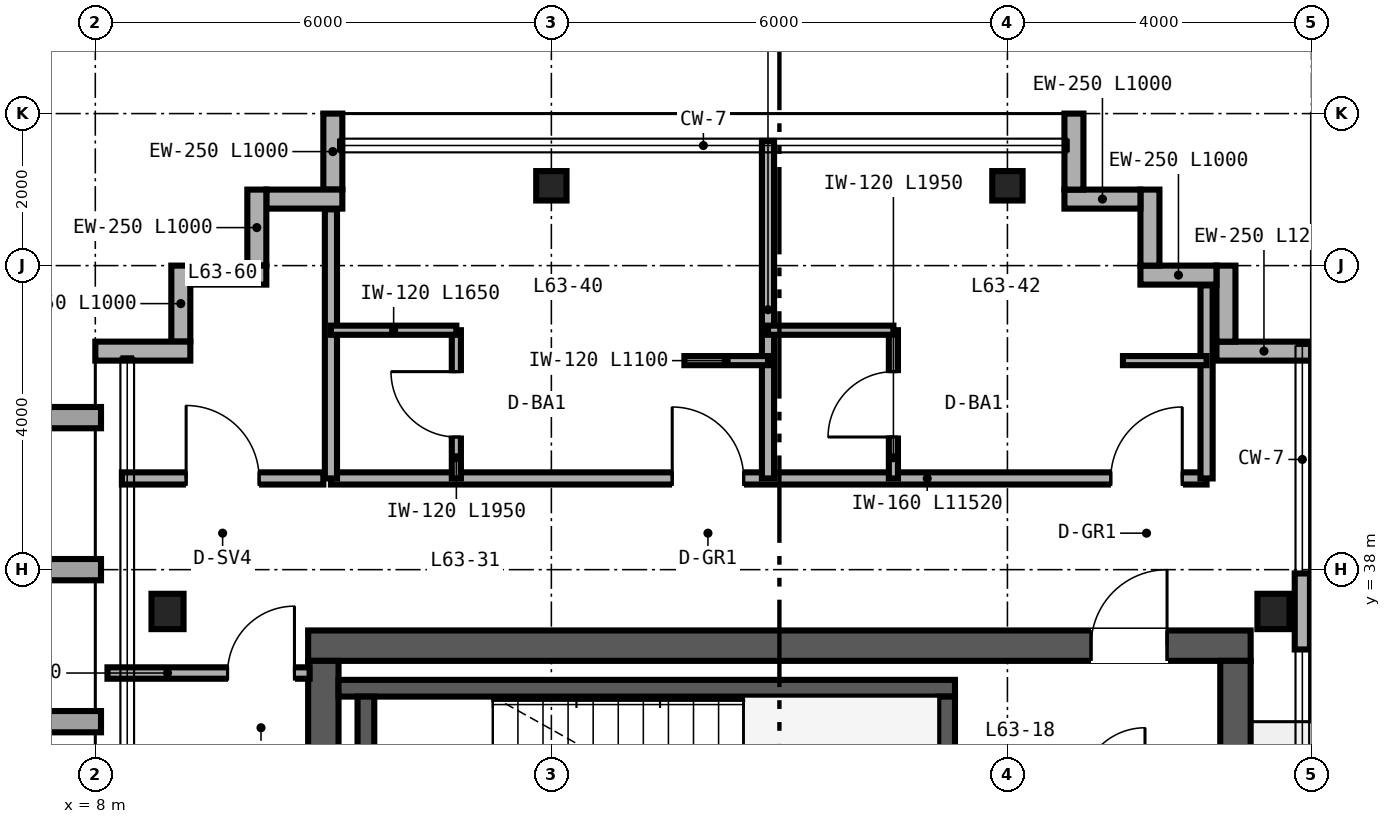
"""IFC4 building model, lengths in metres.
Left out: names, types, materials, properties, quantities, classifications, styles, units other than length and angle.
Written with IfcOpenShell. Run it as: python <this file> out.ifc"""

import sys

from ifc_helpers import new_model, si_unit, direction, frame, frame_2d, origin, origin_2d, place, context, subcontext, project, spatial, rectangle, i_section, extrude, source, transform, mapped, element, fill, save


model = new_model("IFC4")
c1 = context("Model", 3, precision=1e-05, world=origin(), true_north=direction((0.0, 1.0)))
c2 = subcontext(c1, "Body", "Model", "MODEL_VIEW")
j1 = project(units=[si_unit("LENGTHUNIT", "METRE"), si_unit("PLANEANGLEUNIT", "RADIAN")], contexts=[c1])
p1 = place(None, origin())
s1 = spatial("IfcSite", under=j1, at=p1, CompositionType="ELEMENT")
p2 = place(p1, origin())
s2 = spatial("IfcBuilding", under=s1, at=p2, CompositionType="ELEMENT")
p3 = place(p2, frame((0.0, 0.0, 250.8)))
s3 = spatial("IfcBuildingStorey", under=s2, at=p3, CompositionType="ELEMENT", Elevation=250.8)
p4 = place(p3, frame((10.8, 37.0, 0.0), z_axis=(0.0, 0.0, 1.0), x_axis=(1.0, 0.0, 0.0)))
e1 = element("IfcWall", 1, at=p4, inside=s3, PredefinedType="SHEAR", context=c2, shape_type="SweptSolid", body=[
    extrude(rectangle(XDim=12.4, YDim=0.4, at=frame_2d((6.2, 0.0))), origin(), (0.0, 0.0, 1.0), 3.38),
])
p5 = place(p4, frame((10.3, 0.0, 0.0)))
e2 = element("IfcOpeningElement", 2, at=p5, cuts=e1, PredefinedType="OPENING", context=c2, shape_type="SweptSolid", body=[
    extrude(rectangle(XDim=1.0, YDim=2.15, at=frame_2d((0.5, 1.075))), frame((0.0, 0.21, 0.0), z_axis=(0.0, -1.0, 0.0), x_axis=(1.0, 0.0, 0.0)), (0.0, 0.0, 1.0), 0.42),
])
for number, where, z_axis, x_axis in (
    (3, (11.0, 15.2, 0.0), (0.0, 0.0, 1.0), (0.0, 1.0, 0.0)),
    (4, (23.0, 15.2, 0.0), (0.0, 0.0, 1.0), (0.0, 1.0, 0.0)),
):
    element("IfcWall", number, at=place(p3, frame(where, z_axis=z_axis, x_axis=x_axis)), inside=s3, PredefinedType="SHEAR", context=c2, shape_type="SweptSolid", body=[
        extrude(rectangle(XDim=21.6, YDim=0.4, at=frame_2d((10.8, 0.0))), origin(), (0.0, 0.0, 1.0), 3.38),
    ])
p6 = place(p3, frame((11.2, 36.44, 0.0), z_axis=(0.0, 0.0, 1.0), x_axis=(1.0, 0.0, 0.0)))
e5 = element("IfcWall", 5, at=p6, inside=s3, PredefinedType="SHEAR", context=c2, shape_type="SweptSolid", body=[
    extrude(rectangle(XDim=8.11, YDim=0.22, at=frame_2d((4.055, 0.0))), origin(), (0.0, 0.0, 1.0), 3.4),
])
for number, where, z_axis, x_axis in (
    (6, (11.56, 33.05, 0.0), (0.0, 0.0, 1.0), (0.0, 1.0, 0.0)),
    (7, (19.2, 33.05, 0.0), (0.0, 0.0, 1.0), (0.0, 1.0, 0.0)),
):
    element("IfcWall", number, at=place(p3, frame(where, z_axis=z_axis, x_axis=x_axis)), inside=s3, PredefinedType="SHEAR", context=c2, shape_type="SweptSolid", body=[
        extrude(rectangle(XDim=3.28, YDim=0.22, at=frame_2d((1.64, 0.0))), origin(), (0.0, 0.0, 1.0), 3.4),
    ])
m1 = source(origin(), c2, "Body", "SweptSolid", [
    extrude(i_section(OverallWidth=0.422, OverallDepth=0.465, WebThickness=0.045, FlangeThickness=0.073, FilletRadius=0.025, at=origin_2d()), origin(), (0.0, 0.0, 1.0), 3.38),
])
for number, where, z_axis, x_axis in (
    (8, (8.95, 37.45, 0.0), (0.0, 0.0, 1.0), (1.0, 0.0, 0.0)),
    (9, (23.5, 37.45, 0.0), (0.0, 0.0, 1.0), (1.0, 0.0, 0.0)),
):
    element("IfcColumn", number, at=place(p3, frame(where, z_axis=z_axis, x_axis=x_axis)), inside=s3, PredefinedType="COLUMN", context=c2, shape_type="MappedRepresentation", body=[
        mapped(m1, transform((0.0, 0.0, 0.0), scale=1.0)),
    ])
m2 = source(origin(), c2, "Body", "SweptSolid", [
    extrude(i_section(OverallWidth=0.399, OverallDepth=0.387, WebThickness=0.021, FlangeThickness=0.033, FilletRadius=0.025, at=origin_2d()), origin(), (0.0, 0.0, 1.0), 3.38),
])
for number, where, z_axis, x_axis in (
    (10, (14.0, 43.05, 0.0), (0.0, 0.0, 1.0), (1.0, 0.0, 0.0)),
    (11, (20.0, 43.05, 0.0), (0.0, 0.0, 1.0), (1.0, 0.0, 0.0)),
):
    element("IfcColumn", number, at=place(p3, frame(where, z_axis=z_axis, x_axis=x_axis)), inside=s3, PredefinedType="COLUMN", context=c2, shape_type="MappedRepresentation", body=[
        mapped(m2, transform((0.0, 0.0, 0.0), scale=1.0)),
    ])
p7 = place(p3, frame((24.0, 40.875, 0.0), z_axis=(0.0, 0.0, 1.0), x_axis=(-1.0, 0.0, 0.0)))
e12 = element("IfcWall", 12, at=p7, inside=s3, PredefinedType="SOLIDWALL", context=c2, shape_type="SweptSolid", body=[
    extrude(rectangle(XDim=1.25, YDim=0.25, at=frame_2d((0.625, 0.0))), origin(), (0.0, 0.0, 1.0), 3.38),
])
for number, where, z_axis, x_axis in (
    (13, (22.875, 41.0, 0.0), (0.0, 0.0, 1.0), (0.0, 1.0, 0.0)),
    (14, (22.75, 41.875, 0.0), (0.0, 0.0, 1.0), (-1.0, 0.0, 0.0)),
    (15, (21.875, 42.0, 0.0), (0.0, 0.0, 1.0), (0.0, 1.0, 0.0)),
    (16, (21.75, 42.875, 0.0), (0.0, 0.0, 1.0), (-1.0, 0.0, 0.0)),
    (17, (20.875, 43.0, 0.0), (0.0, 0.0, 1.0), (0.0, 1.0, 0.0)),
    (18, (11.125, 44.0, 0.0), (0.0, 0.0, 1.0), (0.0, -1.0, 0.0)),
    (19, (11.25, 42.875, 0.0), (0.0, 0.0, 1.0), (-1.0, 0.0, 0.0)),
    (20, (10.125, 43.0, 0.0), (0.0, 0.0, 1.0), (0.0, -1.0, 0.0)),
    (21, (10.25, 41.875, 0.0), (0.0, 0.0, 1.0), (-1.0, 0.0, 0.0)),
    (22, (9.125, 42.0, 0.0), (0.0, 0.0, 1.0), (0.0, -1.0, 0.0)),
):
    element("IfcWall", number, at=place(p3, frame(where, z_axis=z_axis, x_axis=x_axis)), inside=s3, PredefinedType="SOLIDWALL", context=c2, shape_type="SweptSolid", body=[
        extrude(rectangle(XDim=1.0, YDim=0.25, at=frame_2d((0.5, 0.0))), origin(), (0.0, 0.0, 1.0), 3.38),
    ])
p8 = place(p3, frame((9.25, 40.875, 0.0), z_axis=(0.0, 0.0, 1.0), x_axis=(-1.0, 0.0, 0.0)))
e23 = element("IfcWall", 23, at=p8, inside=s3, PredefinedType="SOLIDWALL", context=c2, shape_type="SweptSolid", body=[
    extrude(rectangle(XDim=1.25, YDim=0.25, at=frame_2d((0.625, 0.0))), origin(), (0.0, 0.0, 1.0), 3.38),
])
p9 = place(p3, frame((23.88, 36.95, 0.0), z_axis=(0.0, 0.0, 1.0), x_axis=(0.0, 1.0, 0.0)))
e24 = element("IfcWall", 24, at=p9, inside=s3, PredefinedType="PARAPET", context=c2, shape_type="SweptSolid", body=[
    extrude(rectangle(XDim=1.0, YDim=0.2, at=frame_2d((0.5, 0.0))), origin(), (0.0, 0.0, 1.0), 3.38),
])
p10 = place(p3, frame((11.1, 39.2, 0.0), z_axis=(0.0, 0.0, 1.0), x_axis=(1.0, 0.0, 0.0)))
e25 = element("IfcWall", 25, at=p10, inside=s3, PredefinedType="PARTITIONING", context=c2, shape_type="SweptSolid", body=[
    extrude(rectangle(XDim=11.52, YDim=0.16, at=frame_2d((5.76, 0.0))), origin(), (0.0, 0.0, 1.0), 3.38),
])
p11 = place(p10, frame((4.49, 0.0, 0.0)))
e26 = element("IfcOpeningElement", 26, at=p11, cuts=e25, PredefinedType="OPENING", context=c2, shape_type="SweptSolid", body=[
    extrude(rectangle(XDim=0.94, YDim=2.15, at=frame_2d((0.47, 1.075))), frame((0.0, 0.09, 0.0), z_axis=(0.0, -1.0, 0.0), x_axis=(1.0, 0.0, 0.0)), (0.0, 0.0, 1.0), 0.18),
])
p12 = place(p10, frame((10.26, 0.0, 0.0)))
e27 = element("IfcOpeningElement", 27, at=p12, cuts=e25, PredefinedType="OPENING", context=c2, shape_type="SweptSolid", body=[
    extrude(rectangle(XDim=0.94, YDim=2.15, at=frame_2d((0.47, 1.075))), frame((0.0, 0.09, 0.0), z_axis=(0.0, -1.0, 0.0), x_axis=(1.0, 0.0, 0.0)), (0.0, 0.0, 1.0), 0.18),
])
p13 = place(p3, frame((11.1, 39.2, 0.0), z_axis=(0.0, 0.0, 1.0), x_axis=(0.0, 1.0, 0.0)))
e28 = element("IfcWall", 28, at=p13, inside=s3, PredefinedType="PARTITIONING", context=c2, shape_type="SweptSolid", body=[
    extrude(rectangle(XDim=3.54, YDim=0.16, at=frame_2d((1.77, 0.0))), origin(), (0.0, 0.0, 1.0), 3.38),
])
p14 = place(p3, frame((22.62, 39.2, 0.0), z_axis=(0.0, 0.0, 1.0), x_axis=(0.0, 1.0, 0.0)))
e29 = element("IfcWall", 29, at=p14, inside=s3, PredefinedType="PARTITIONING", context=c2, shape_type="SweptSolid", body=[
    extrude(rectangle(XDim=2.54, YDim=0.16, at=frame_2d((1.27, 0.0))), origin(), (0.0, 0.0, 1.0), 3.38),
])
p15 = place(p3, frame((16.85, 39.2, 0.0), z_axis=(0.0, 0.0, 1.0), x_axis=(0.0, 1.0, 0.0)))
e30 = element("IfcWall", 30, at=p15, inside=s3, PredefinedType="PARTITIONING", context=c2, shape_type="SweptSolid", body=[
    extrude(rectangle(XDim=4.44, YDim=0.16, at=frame_2d((2.22, 0.0))), origin(), (0.0, 0.0, 1.0), 2.687),
])
p16 = place(p3, frame((12.75, 39.2, 0.0), z_axis=(0.0, 0.0, 1.0), x_axis=(0.0, 1.0, 0.0)))
e31 = element("IfcWall", 31, at=p16, inside=s3, PredefinedType="PARTITIONING", context=c2, shape_type="SweptSolid", body=[
    extrude(rectangle(XDim=1.95, YDim=0.12, at=frame_2d((0.975, 0.0))), origin(), (0.0, 0.0, 1.0), 3.38),
])
p17 = place(p16, frame((0.545, 0.0, 0.0)))
e32 = element("IfcOpeningElement", 32, at=p17, cuts=e31, PredefinedType="OPENING", context=c2, shape_type="SweptSolid", body=[
    extrude(rectangle(XDim=0.86, YDim=2.1, at=frame_2d((0.43, 1.05))), frame((0.0, 0.07, 0.0), z_axis=(0.0, -1.0, 0.0), x_axis=(1.0, 0.0, 0.0)), (0.0, 0.0, 1.0), 0.14),
])
p18 = place(p3, frame((11.1, 41.15, 0.0), z_axis=(0.0, 0.0, 1.0), x_axis=(1.0, 0.0, 0.0)))
e33 = element("IfcWall", 33, at=p18, inside=s3, PredefinedType="PARTITIONING", context=c2, shape_type="SweptSolid", body=[
    extrude(rectangle(XDim=1.65, YDim=0.12, at=frame_2d((0.825, 0.0))), origin(), (0.0, 0.0, 1.0), 3.38),
])
p19 = place(p3, frame((15.75, 40.75, 0.0), z_axis=(0.0, 0.0, 1.0), x_axis=(1.0, 0.0, 0.0)))
e34 = element("IfcWall", 34, at=p19, inside=s3, PredefinedType="PARTITIONING", context=c2, shape_type="SweptSolid", body=[
    extrude(rectangle(XDim=1.1, YDim=0.12, at=frame_2d((0.55, 0.0))), origin(), (0.0, 0.0, 1.0), 3.38),
])
p20 = place(p3, frame((18.5, 39.2, 0.0), z_axis=(0.0, 0.0, 1.0), x_axis=(0.0, 1.0, 0.0)))
e35 = element("IfcWall", 35, at=p20, inside=s3, PredefinedType="PARTITIONING", context=c2, shape_type="SweptSolid", body=[
    extrude(rectangle(XDim=1.95, YDim=0.12, at=frame_2d((0.975, 0.0))), origin(), (0.0, 0.0, 1.0), 3.38),
])
p21 = place(p20, frame((0.545, 0.0, 0.0)))
e36 = element("IfcOpeningElement", 36, at=p21, cuts=e35, PredefinedType="OPENING", context=c2, shape_type="SweptSolid", body=[
    extrude(rectangle(XDim=0.86, YDim=2.1, at=frame_2d((0.43, 1.05))), frame((0.0, 0.07, 0.0), z_axis=(0.0, -1.0, 0.0), x_axis=(1.0, 0.0, 0.0)), (0.0, 0.0, 1.0), 0.14),
])
p22 = place(p3, frame((16.85, 41.15, 0.0), z_axis=(0.0, 0.0, 1.0), x_axis=(1.0, 0.0, 0.0)))
e37 = element("IfcWall", 37, at=p22, inside=s3, PredefinedType="PARTITIONING", context=c2, shape_type="SweptSolid", body=[
    extrude(rectangle(XDim=1.65, YDim=0.12, at=frame_2d((0.825, 0.0))), origin(), (0.0, 0.0, 1.0), 3.38),
])
p23 = place(p3, frame((21.52, 40.75, 0.0), z_axis=(0.0, 0.0, 1.0), x_axis=(1.0, 0.0, 0.0)))
e38 = element("IfcWall", 38, at=p23, inside=s3, PredefinedType="PARTITIONING", context=c2, shape_type="SweptSolid", body=[
    extrude(rectangle(XDim=1.1, YDim=0.12, at=frame_2d((0.55, 0.0))), origin(), (0.0, 0.0, 1.0), 3.38),
])
p24 = place(p3, frame((8.16, 36.64, 0.0), z_axis=(0.0, 0.0, 1.0), x_axis=(1.0, 0.0, 0.0)))
e39 = element("IfcWall", 39, at=p24, inside=s3, PredefinedType="PARTITIONING", context=c2, shape_type="SweptSolid", body=[
    extrude(rectangle(XDim=2.66, YDim=0.15, at=frame_2d((1.33, 0.0))), origin(), (0.0, 0.0, 1.0), 2.763),
])
p25 = place(p24, frame((1.58, 0.0, 0.0)))
e40 = element("IfcOpeningElement", 40, at=p25, cuts=e39, PredefinedType="OPENING", context=c2, shape_type="SweptSolid", body=[
    extrude(rectangle(XDim=0.88, YDim=2.15, at=frame_2d((0.44, 1.075))), frame((0.0, 0.085, 0.0), z_axis=(0.0, -1.0, 0.0), x_axis=(1.0, 0.0, 0.0)), (0.0, 0.0, 1.0), 0.17),
])
p26 = place(p3, frame((8.35, 39.2, 0.0), z_axis=(0.0, 0.0, 1.0), x_axis=(1.0, 0.0, 0.0)))
e41 = element("IfcWall", 41, at=p26, inside=s3, PredefinedType="PARTITIONING", context=c2, shape_type="SweptSolid", body=[
    extrude(rectangle(XDim=2.65, YDim=0.16, at=frame_2d((1.325, 0.0))), origin(), (0.0, 0.0, 1.0), 3.38),
])
p27 = place(p26, frame((0.845, 0.0, 0.0)))
e42 = element("IfcOpeningElement", 42, at=p27, cuts=e41, PredefinedType="OPENING", context=c2, shape_type="SweptSolid", body=[
    extrude(rectangle(XDim=0.96, YDim=2.15, at=frame_2d((0.48, 1.075))), frame((0.0, 0.09, 0.0), z_axis=(0.0, -1.0, 0.0), x_axis=(1.0, 0.0, 0.0)), (0.0, 0.0, 1.0), 0.18),
])
m3 = source(origin(), c2, "Body", "SweptSolid", [
    extrude(rectangle(XDim=1.0, YDim=2.15, at=frame_2d((0.5, 1.075))), frame((0.0, 0.025, 0.0), z_axis=(0.0, -1.0, 0.0), x_axis=(1.0, 0.0, 0.0)), (0.0, 0.0, 1.0), 0.05),
])
p28 = place(p5, origin())
e43 = element("IfcDoor", 43, at=p28, inside=s3, OperationType="SINGLE_SWING_RIGHT", PredefinedType="DOOR", context=c2, shape_type="MappedRepresentation", body=[
    mapped(m3, transform((0.0, 0.0, 0.0), scale=1.0)),
])
fill(e2, e43)
m4 = source(origin(), c2, "Body", "SweptSolid", [
    extrude(rectangle(XDim=0.86, YDim=2.1, at=frame_2d((0.43, 1.05))), frame((0.0, 0.025, 0.0), z_axis=(0.0, -1.0, 0.0), x_axis=(1.0, 0.0, 0.0)), (0.0, 0.0, 1.0), 0.05),
])
p29 = place(p17, origin())
e44 = element("IfcDoor", 44, at=p29, inside=s3, OperationType="SINGLE_SWING_RIGHT", PredefinedType="DOOR", context=c2, shape_type="MappedRepresentation", body=[
    mapped(m4, transform((0.0, 0.0, 0.0), scale=1.0)),
])
fill(e32, e44)
p30 = place(p21, origin())
e45 = element("IfcDoor", 45, at=p30, inside=s3, OperationType="SINGLE_SWING_LEFT", PredefinedType="DOOR", context=c2, shape_type="MappedRepresentation", body=[
    mapped(m4, transform((0.0, 0.0, 0.0), scale=1.0)),
])
fill(e36, e45)
m5 = source(origin(), c2, "Body", "SweptSolid", [
    extrude(rectangle(XDim=0.94, YDim=2.15, at=frame_2d((0.47, 1.075))), frame((0.0, 0.025, 0.0), z_axis=(0.0, -1.0, 0.0), x_axis=(1.0, 0.0, 0.0)), (0.0, 0.0, 1.0), 0.05),
])
p31 = place(p11, origin())
e46 = element("IfcDoor", 46, at=p31, inside=s3, OperationType="SINGLE_SWING_LEFT", PredefinedType="DOOR", context=c2, shape_type="MappedRepresentation", body=[
    mapped(m5, transform((0.0, 0.0, 0.0), scale=1.0)),
])
fill(e26, e46)
p32 = place(p12, origin())
e47 = element("IfcDoor", 47, at=p32, inside=s3, OperationType="SINGLE_SWING_RIGHT", PredefinedType="DOOR", context=c2, shape_type="MappedRepresentation", body=[
    mapped(m5, transform((0.0, 0.0, 0.0), scale=1.0)),
])
fill(e27, e47)
m6 = source(origin(), c2, "Body", "SweptSolid", [
    extrude(rectangle(XDim=0.88, YDim=2.15, at=frame_2d((0.44, 1.075))), frame((0.0, 0.025, 0.0), z_axis=(0.0, -1.0, 0.0), x_axis=(1.0, 0.0, 0.0)), (0.0, 0.0, 1.0), 0.05),
])
p33 = place(p25, origin())
e48 = element("IfcDoor", 48, at=p33, inside=s3, OperationType="SINGLE_SWING_RIGHT", PredefinedType="DOOR", context=c2, shape_type="MappedRepresentation", body=[
    mapped(m6, transform((0.0, 0.0, 0.0), scale=1.0)),
])
fill(e40, e48)
m7 = source(origin(), c2, "Body", "SweptSolid", [
    extrude(rectangle(XDim=0.96, YDim=2.15, at=frame_2d((0.48, 1.075))), frame((0.0, 0.025, 0.0), z_axis=(0.0, -1.0, 0.0), x_axis=(1.0, 0.0, 0.0)), (0.0, 0.0, 1.0), 0.05),
])
p34 = place(p27, origin())
e49 = element("IfcDoor", 49, at=p34, inside=s3, OperationType="SINGLE_SWING_LEFT", PredefinedType="DOOR", context=c2, shape_type="MappedRepresentation", body=[
    mapped(m7, transform((0.0, 0.0, 0.0), scale=1.0)),
])
fill(e42, e49)
save(model, sys.argv[1])
